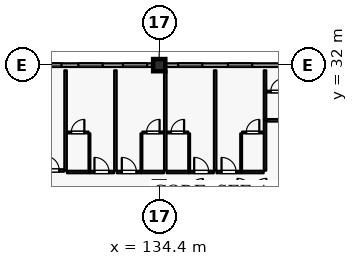
"""IFC4 building model, lengths in metres.
Left out: names, types, materials, properties, quantities, classifications, styles, units other than length and angle.
Written with IfcOpenShell. Run it as: python <this file> out.ifc"""

import sys

from ifc_helpers import new_model, si_unit, direction, frame, frame_2d, origin, origin_2d, place, context, subcontext, project, spatial, rectangle, extrude, element, fill, save


model = new_model("IFC4")
c1 = context("Model", 3, precision=1e-05, world=origin(), true_north=direction((0.0, 1.0)))
c2 = subcontext(c1, "Body", "Model", "MODEL_VIEW")
j1 = project(units=[si_unit("LENGTHUNIT", "METRE"), si_unit("PLANEANGLEUNIT", "RADIAN")], contexts=[c1])
p1 = place(None, origin())
s1 = spatial("IfcSite", under=j1, at=p1, CompositionType="ELEMENT")
p2 = place(p1, origin())
s2 = spatial("IfcBuilding", under=s1, at=p2, CompositionType="ELEMENT")
p3 = place(p2, frame((0.0, 0.0, 16.2)))
s3 = spatial("IfcBuildingStorey", under=s2, at=p3, CompositionType="ELEMENT", Elevation=16.2)
p4 = place(p3, frame((134.4, 32.0, 0.0), z_axis=(0.0, 0.0, 1.0), x_axis=(1.0, 0.0, 0.0)))
e1 = element("IfcColumn", 1, at=p4, inside=s3, PredefinedType="COLUMN", context=c2, shape_type="SweptSolid", body=[
    extrude(rectangle(XDim=0.8, YDim=0.8, at=origin_2d()), origin(), (0.0, 0.0, 1.0), 4.8),
])
p5 = place(p3, frame((134.4, 24.0, 0.0), z_axis=(0.0, 0.0, 1.0), x_axis=(1.0, 0.0, 0.0)))
e2 = element("IfcColumn", 2, at=p5, inside=s3, PredefinedType="COLUMN", context=c2, shape_type="SweptSolid", body=[
    extrude(rectangle(XDim=0.7, YDim=0.7, at=origin_2d()), origin(), (0.0, 0.0, 1.0), 4.8),
])
p6 = place(p3, frame((126.4, 32.0, 0.0), z_axis=(0.0, 0.0, 1.0), x_axis=(1.0, 0.0, 0.0)))
e3 = element("IfcWall", 3, at=p6, inside=s3, PredefinedType="SOLIDWALL", context=c2, shape_type="SweptSolid", body=[
    extrude(rectangle(XDim=7.6, YDim=0.24, at=frame_2d((3.8, 0.0))), origin(), (0.0, 0.0, 1.0), 4.09),
])
p7 = place(p6, frame((0.17, 0.0, 0.8)))
e4 = element("IfcOpeningElement", 4, at=p7, cuts=e3, PredefinedType="OPENING", context=c2, shape_type="SweptSolid", body=[
    extrude(rectangle(XDim=1.4, YDim=1.6, at=frame_2d((0.7, 0.8))), frame((0.0, 0.13, 0.0), z_axis=(0.0, -1.0, 0.0), x_axis=(1.0, 0.0, 0.0)), (0.0, 0.0, 1.0), 0.26),
])
p8 = place(p6, frame((2.68, 0.0, 0.8)))
e5 = element("IfcOpeningElement", 5, at=p8, cuts=e3, PredefinedType="OPENING", context=c2, shape_type="SweptSolid", body=[
    extrude(rectangle(XDim=1.6, YDim=1.6, at=frame_2d((0.8, 0.8))), frame((0.0, 0.13, 0.0), z_axis=(0.0, -1.0, 0.0), x_axis=(1.0, 0.0, 0.0)), (0.0, 0.0, 1.0), 0.26),
])
p9 = place(p6, frame((5.61, 0.0, 0.8)))
e6 = element("IfcOpeningElement", 6, at=p9, cuts=e3, PredefinedType="OPENING", context=c2, shape_type="SweptSolid", body=[
    extrude(rectangle(XDim=1.6, YDim=1.6, at=frame_2d((0.8, 0.8))), frame((0.0, 0.13, 0.0), z_axis=(0.0, -1.0, 0.0), x_axis=(1.0, 0.0, 0.0)), (0.0, 0.0, 1.0), 0.26),
])
p10 = place(p3, frame((134.8, 32.0, 0.0), z_axis=(0.0, 0.0, 1.0), x_axis=(1.0, 0.0, 0.0)))
e7 = element("IfcWall", 7, at=p10, inside=s3, PredefinedType="SOLIDWALL", context=c2, shape_type="SweptSolid", body=[
    extrude(rectangle(XDim=7.6, YDim=0.24, at=frame_2d((3.8, 0.0))), origin(), (0.0, 0.0, 1.0), 4.13),
])
p11 = place(p10, frame((0.84, 0.0, 0.8)))
e8 = element("IfcOpeningElement", 8, at=p11, cuts=e7, PredefinedType="OPENING", context=c2, shape_type="SweptSolid", body=[
    extrude(rectangle(XDim=1.6, YDim=1.6, at=frame_2d((0.8, 0.8))), frame((0.0, 0.13, 0.0), z_axis=(0.0, -1.0, 0.0), x_axis=(1.0, 0.0, 0.0)), (0.0, 0.0, 1.0), 0.26),
])
p12 = place(p10, frame((4.12, 0.0, 0.8)))
e9 = element("IfcOpeningElement", 9, at=p12, cuts=e7, PredefinedType="OPENING", context=c2, shape_type="SweptSolid", body=[
    extrude(rectangle(XDim=1.6, YDim=1.6, at=frame_2d((0.8, 0.8))), frame((0.0, 0.13, 0.0), z_axis=(0.0, -1.0, 0.0), x_axis=(1.0, 0.0, 0.0)), (0.0, 0.0, 1.0), 0.26),
])
p13 = place(p3, frame((126.53, 25.07, 0.0), z_axis=(0.0, 0.0, 1.0), x_axis=(1.0, 0.0, 0.0)))
e10 = element("IfcWall", 10, at=p13, inside=s3, PredefinedType="PARTITIONING", context=c2, shape_type="SweptSolid", body=[
    extrude(rectangle(XDim=1.62, YDim=0.16, at=frame_2d((0.81, 0.0))), origin(), (0.0, 0.0, 1.0), 4.535),
])
p14 = place(p13, frame((0.33, 0.0, 0.0)))
e11 = element("IfcOpeningElement", 11, at=p14, cuts=e10, PredefinedType="OPENING", context=c2, shape_type="SweptSolid", body=[
    extrude(rectangle(XDim=0.96, YDim=2.2, at=frame_2d((0.48, 1.1))), frame((0.0, 0.09, 0.0), z_axis=(0.0, -1.0, 0.0), x_axis=(1.0, 0.0, 0.0)), (0.0, 0.0, 1.0), 0.18),
])
p15 = place(p3, frame((128.33, 24.97, 0.0), z_axis=(0.0, 0.0, 1.0), x_axis=(1.0, 0.0, 0.0)))
e12 = element("IfcWall", 12, at=p15, inside=s3, PredefinedType="PARTITIONING", context=c2, shape_type="SweptSolid", body=[
    extrude(rectangle(XDim=1.47, YDim=0.16, at=frame_2d((0.735, 0.0))), origin(), (0.0, 0.0, 1.0), 4.535),
])
p16 = place(p3, frame((129.81, 24.97, 0.0), z_axis=(0.0, 0.0, 1.0), x_axis=(1.0, 0.0, 0.0)))
e13 = element("IfcWall", 13, at=p16, inside=s3, PredefinedType="PARTITIONING", context=c2, shape_type="SweptSolid", body=[
    extrude(rectangle(XDim=1.62, YDim=0.16, at=frame_2d((0.81, 0.0))), origin(), (0.0, 0.0, 1.0), 4.535),
])
p17 = place(p16, frame((0.33, 0.0, 0.0)))
e14 = element("IfcOpeningElement", 14, at=p17, cuts=e13, PredefinedType="OPENING", context=c2, shape_type="SweptSolid", body=[
    extrude(rectangle(XDim=0.96, YDim=2.2, at=frame_2d((0.48, 1.1))), frame((0.0, 0.09, 0.0), z_axis=(0.0, -1.0, 0.0), x_axis=(1.0, 0.0, 0.0)), (0.0, 0.0, 1.0), 0.18),
])
p18 = place(p3, frame((129.81, 25.06, 0.0), z_axis=(0.0, 0.0, 1.0), x_axis=(0.0, 1.0, 0.0)))
e15 = element("IfcWall", 15, at=p18, inside=s3, PredefinedType="PARTITIONING", context=c2, shape_type="SweptSolid", body=[
    extrude(rectangle(XDim=2.45, YDim=0.115, at=frame_2d((1.225, 0.0))), origin(), (0.0, 0.0, 1.0), 4.535),
])
p19 = place(p3, frame((128.34, 27.57, 0.0), z_axis=(0.0, 0.0, 1.0), x_axis=(1.0, 0.0, 0.0)))
e16 = element("IfcWall", 16, at=p19, inside=s3, PredefinedType="PARTITIONING", context=c2, shape_type="SweptSolid", body=[
    extrude(rectangle(XDim=1.41, YDim=0.115, at=frame_2d((0.705, 0.0))), origin(), (0.0, 0.0, 1.0), 4.535),
])
p20 = place(p19, frame((0.275, 0.0, 0.0)))
e17 = element("IfcOpeningElement", 17, at=p20, cuts=e16, PredefinedType="OPENING", context=c2, shape_type="SweptSolid", body=[
    extrude(rectangle(XDim=0.86, YDim=2.12, at=frame_2d((0.43, 1.06))), frame((0.0, 0.067, 0.0), z_axis=(0.0, -1.0, 0.0), x_axis=(1.0, 0.0, 0.0)), (0.0, 0.0, 1.0), 0.135),
])
p21 = place(p3, frame((128.24, 25.06, 0.0), z_axis=(0.0, 0.0, 1.0), x_axis=(0.0, 1.0, 0.0)))
e18 = element("IfcWall", 18, at=p21, inside=s3, PredefinedType="PARTITIONING", context=c2, shape_type="SweptSolid", body=[
    extrude(rectangle(XDim=6.6, YDim=0.16, at=frame_2d((3.3, 0.0))), origin(), (0.0, 0.0, 1.0), 4.535),
])
p22 = place(p3, frame((131.61, 24.97, 0.0), z_axis=(0.0, 0.0, 1.0), x_axis=(1.0, 0.0, 0.0)))
e19 = element("IfcWall", 19, at=p22, inside=s3, PredefinedType="PARTITIONING", context=c2, shape_type="SweptSolid", body=[
    extrude(rectangle(XDim=1.62, YDim=0.16, at=frame_2d((0.81, 0.0))), origin(), (0.0, 0.0, 1.0), 4.535),
])
p23 = place(p22, frame((0.33, 0.0, 0.0)))
e20 = element("IfcOpeningElement", 20, at=p23, cuts=e19, PredefinedType="OPENING", context=c2, shape_type="SweptSolid", body=[
    extrude(rectangle(XDim=0.96, YDim=2.2, at=frame_2d((0.48, 1.1))), frame((0.0, 0.09, 0.0), z_axis=(0.0, -1.0, 0.0), x_axis=(1.0, 0.0, 0.0)), (0.0, 0.0, 1.0), 0.18),
])
p24 = place(p3, frame((133.24, 24.97, 0.0), z_axis=(0.0, 0.0, 1.0), x_axis=(1.0, 0.0, 0.0)))
e21 = element("IfcWall", 21, at=p24, inside=s3, PredefinedType="PARTITIONING", context=c2, shape_type="SweptSolid", body=[
    extrude(rectangle(XDim=1.47, YDim=0.16, at=frame_2d((0.735, 0.0))), origin(), (0.0, 0.0, 1.0), 4.535),
])
p25 = place(p3, frame((133.23, 25.06, 0.0), z_axis=(0.0, 0.0, 1.0), x_axis=(0.0, 1.0, 0.0)))
e22 = element("IfcWall", 22, at=p25, inside=s3, PredefinedType="PARTITIONING", context=c2, shape_type="SweptSolid", body=[
    extrude(rectangle(XDim=2.45, YDim=0.115, at=frame_2d((1.225, 0.0))), origin(), (0.0, 0.0, 1.0), 4.535),
])
p26 = place(p3, frame((133.29, 27.57, 0.0), z_axis=(0.0, 0.0, 1.0), x_axis=(1.0, 0.0, 0.0)))
e23 = element("IfcWall", 23, at=p26, inside=s3, PredefinedType="PARTITIONING", context=c2, shape_type="SweptSolid", body=[
    extrude(rectangle(XDim=1.41, YDim=0.115, at=frame_2d((0.705, 0.0))), origin(), (0.0, 0.0, 1.0), 4.535),
])
p27 = place(p26, frame((0.275, 0.0, 0.0)))
e24 = element("IfcOpeningElement", 24, at=p27, cuts=e23, PredefinedType="OPENING", context=c2, shape_type="SweptSolid", body=[
    extrude(rectangle(XDim=0.86, YDim=2.12, at=frame_2d((0.43, 1.06))), frame((0.0, 0.067, 0.0), z_axis=(0.0, -1.0, 0.0), x_axis=(1.0, 0.0, 0.0)), (0.0, 0.0, 1.0), 0.135),
])
p28 = place(p3, frame((131.52, 25.06, 0.0), z_axis=(0.0, 0.0, 1.0), x_axis=(0.0, 1.0, 0.0)))
e25 = element("IfcWall", 25, at=p28, inside=s3, PredefinedType="PARTITIONING", context=c2, shape_type="SweptSolid", body=[
    extrude(rectangle(XDim=6.6, YDim=0.16, at=frame_2d((3.3, 0.0))), origin(), (0.0, 0.0, 1.0), 4.535),
])
p29 = place(p3, frame((134.89, 24.97, 0.0), z_axis=(0.0, 0.0, 1.0), x_axis=(1.0, 0.0, 0.0)))
e26 = element("IfcWall", 26, at=p29, inside=s3, PredefinedType="PARTITIONING", context=c2, shape_type="SweptSolid", body=[
    extrude(rectangle(XDim=1.47, YDim=0.16, at=frame_2d((0.735, 0.0))), origin(), (0.0, 0.0, 1.0), 4.535),
])
p30 = place(p3, frame((136.37, 24.97, 0.0), z_axis=(0.0, 0.0, 1.0), x_axis=(1.0, 0.0, 0.0)))
e27 = element("IfcWall", 27, at=p30, inside=s3, PredefinedType="PARTITIONING", context=c2, shape_type="SweptSolid", body=[
    extrude(rectangle(XDim=1.62, YDim=0.16, at=frame_2d((0.81, 0.0))), origin(), (0.0, 0.0, 1.0), 4.535),
])
p31 = place(p30, frame((0.33, 0.0, 0.0)))
e28 = element("IfcOpeningElement", 28, at=p31, cuts=e27, PredefinedType="OPENING", context=c2, shape_type="SweptSolid", body=[
    extrude(rectangle(XDim=0.96, YDim=2.2, at=frame_2d((0.48, 1.1))), frame((0.0, 0.09, 0.0), z_axis=(0.0, -1.0, 0.0), x_axis=(1.0, 0.0, 0.0)), (0.0, 0.0, 1.0), 0.18),
])
p32 = place(p3, frame((136.37, 25.06, 0.0), z_axis=(0.0, 0.0, 1.0), x_axis=(0.0, 1.0, 0.0)))
e29 = element("IfcWall", 29, at=p32, inside=s3, PredefinedType="PARTITIONING", context=c2, shape_type="SweptSolid", body=[
    extrude(rectangle(XDim=2.45, YDim=0.115, at=frame_2d((1.225, 0.0))), origin(), (0.0, 0.0, 1.0), 4.535),
])
p33 = place(p3, frame((134.9, 27.57, 0.0), z_axis=(0.0, 0.0, 1.0), x_axis=(1.0, 0.0, 0.0)))
e30 = element("IfcWall", 30, at=p33, inside=s3, PredefinedType="PARTITIONING", context=c2, shape_type="SweptSolid", body=[
    extrude(rectangle(XDim=1.41, YDim=0.115, at=frame_2d((0.705, 0.0))), origin(), (0.0, 0.0, 1.0), 4.535),
])
p34 = place(p33, frame((0.275, 0.0, 0.0)))
e31 = element("IfcOpeningElement", 31, at=p34, cuts=e30, PredefinedType="OPENING", context=c2, shape_type="SweptSolid", body=[
    extrude(rectangle(XDim=0.86, YDim=2.12, at=frame_2d((0.43, 1.06))), frame((0.0, 0.067, 0.0), z_axis=(0.0, -1.0, 0.0), x_axis=(1.0, 0.0, 0.0)), (0.0, 0.0, 1.0), 0.135),
])
p35 = place(p3, frame((134.8, 25.06, 0.0), z_axis=(0.0, 0.0, 1.0), x_axis=(0.0, 1.0, 0.0)))
e32 = element("IfcWall", 32, at=p35, inside=s3, PredefinedType="PARTITIONING", context=c2, shape_type="SweptSolid", body=[
    extrude(rectangle(XDim=6.6, YDim=0.16, at=frame_2d((3.3, 0.0))), origin(), (0.0, 0.0, 1.0), 4.535),
])
p36 = place(p3, frame((138.17, 24.97, 0.0), z_axis=(0.0, 0.0, 1.0), x_axis=(1.0, 0.0, 0.0)))
e33 = element("IfcWall", 33, at=p36, inside=s3, PredefinedType="PARTITIONING", context=c2, shape_type="SweptSolid", body=[
    extrude(rectangle(XDim=1.62, YDim=0.16, at=frame_2d((0.81, 0.0))), origin(), (0.0, 0.0, 1.0), 4.535),
])
p37 = place(p36, frame((0.33, 0.0, 0.0)))
e34 = element("IfcOpeningElement", 34, at=p37, cuts=e33, PredefinedType="OPENING", context=c2, shape_type="SweptSolid", body=[
    extrude(rectangle(XDim=0.96, YDim=2.2, at=frame_2d((0.48, 1.1))), frame((0.0, 0.09, 0.0), z_axis=(0.0, -1.0, 0.0), x_axis=(1.0, 0.0, 0.0)), (0.0, 0.0, 1.0), 0.18),
])
p38 = place(p3, frame((139.8, 24.97, 0.0), z_axis=(0.0, 0.0, 1.0), x_axis=(1.0, 0.0, 0.0)))
e35 = element("IfcWall", 35, at=p38, inside=s3, PredefinedType="PARTITIONING", context=c2, shape_type="SweptSolid", body=[
    extrude(rectangle(XDim=1.47, YDim=0.16, at=frame_2d((0.735, 0.0))), origin(), (0.0, 0.0, 1.0), 4.535),
])
p39 = place(p3, frame((139.79, 25.06, 0.0), z_axis=(0.0, 0.0, 1.0), x_axis=(0.0, 1.0, 0.0)))
e36 = element("IfcWall", 36, at=p39, inside=s3, PredefinedType="PARTITIONING", context=c2, shape_type="SweptSolid", body=[
    extrude(rectangle(XDim=2.45, YDim=0.115, at=frame_2d((1.225, 0.0))), origin(), (0.0, 0.0, 1.0), 4.535),
])
p40 = place(p3, frame((139.85, 27.57, 0.0), z_axis=(0.0, 0.0, 1.0), x_axis=(1.0, 0.0, 0.0)))
e37 = element("IfcWall", 37, at=p40, inside=s3, PredefinedType="PARTITIONING", context=c2, shape_type="SweptSolid", body=[
    extrude(rectangle(XDim=1.41, YDim=0.115, at=frame_2d((0.705, 0.0))), origin(), (0.0, 0.0, 1.0), 4.535),
])
p41 = place(p40, frame((0.275, 0.0, 0.0)))
e38 = element("IfcOpeningElement", 38, at=p41, cuts=e37, PredefinedType="OPENING", context=c2, shape_type="SweptSolid", body=[
    extrude(rectangle(XDim=0.86, YDim=2.12, at=frame_2d((0.43, 1.06))), frame((0.0, 0.067, 0.0), z_axis=(0.0, -1.0, 0.0), x_axis=(1.0, 0.0, 0.0)), (0.0, 0.0, 1.0), 0.135),
])
p42 = place(p3, frame((138.08, 25.06, 0.0), z_axis=(0.0, 0.0, 1.0), x_axis=(0.0, 1.0, 0.0)))
e39 = element("IfcWall", 39, at=p42, inside=s3, PredefinedType="PARTITIONING", context=c2, shape_type="SweptSolid", body=[
    extrude(rectangle(XDim=6.6, YDim=0.16, at=frame_2d((3.3, 0.0))), origin(), (0.0, 0.0, 1.0), 4.535),
])
p43 = place(p3, frame((141.36, 25.06, 0.0), z_axis=(0.0, 0.0, 1.0), x_axis=(0.0, 1.0, 0.0)))
e40 = element("IfcWall", 40, at=p43, inside=s3, PredefinedType="PARTITIONING", context=c2, shape_type="SweptSolid", body=[
    extrude(rectangle(XDim=3.39, YDim=0.16, at=frame_2d((1.695, 0.0))), origin(), (0.0, 0.0, 1.0), 4.535),
])
p44 = place(p3, frame((141.45, 28.37, 0.0), z_axis=(0.0, 0.0, 1.0), x_axis=(1.0, 0.0, 0.0)))
e41 = element("IfcWall", 41, at=p44, inside=s3, PredefinedType="PARTITIONING", context=c2, shape_type="SweptSolid", body=[
    extrude(rectangle(XDim=1.47, YDim=0.16, at=frame_2d((0.735, 0.0))), origin(), (0.0, 0.0, 1.0), 4.535),
])
p45 = place(p3, frame((141.46, 30.26, 0.0), z_axis=(0.0, 0.0, 1.0), x_axis=(1.0, 0.0, 0.0)))
e42 = element("IfcWall", 42, at=p45, inside=s3, PredefinedType="PARTITIONING", context=c2, shape_type="SweptSolid", body=[
    extrude(rectangle(XDim=1.41, YDim=0.115, at=frame_2d((0.705, 0.0))), origin(), (0.0, 0.0, 1.0), 4.535),
])
p46 = place(p45, frame((0.275, 0.0, 0.0)))
e43 = element("IfcOpeningElement", 43, at=p46, cuts=e42, PredefinedType="OPENING", context=c2, shape_type="SweptSolid", body=[
    extrude(rectangle(XDim=0.86, YDim=2.12, at=frame_2d((0.43, 1.06))), frame((0.0, 0.067, 0.0), z_axis=(0.0, -1.0, 0.0), x_axis=(1.0, 0.0, 0.0)), (0.0, 0.0, 1.0), 0.135),
])
p47 = place(p3, frame((141.36, 28.46, 0.0), z_axis=(0.0, 0.0, 1.0), x_axis=(0.0, 1.0, 0.0)))
e44 = element("IfcWall", 44, at=p47, inside=s3, PredefinedType="PARTITIONING", context=c2, shape_type="SweptSolid", body=[
    extrude(rectangle(XDim=3.2, YDim=0.16, at=frame_2d((1.6, 0.0))), origin(), (0.0, 0.0, 1.0), 4.535),
])
p48 = place(p7, origin())
e45 = element("IfcWindow", 45, at=p48, inside=s3, PartitioningType="SINGLE_PANEL", PredefinedType="WINDOW", context=c2, shape_type="SweptSolid", body=[
    extrude(rectangle(XDim=1.4, YDim=1.6, at=frame_2d((0.7, 0.8))), frame((0.0, 0.03, 0.0), z_axis=(0.0, -1.0, 0.0), x_axis=(1.0, 0.0, 0.0)), (0.0, 0.0, 1.0), 0.06),
])
fill(e4, e45)
p49 = place(p8, origin())
e46 = element("IfcWindow", 46, at=p49, inside=s3, PartitioningType="SINGLE_PANEL", PredefinedType="WINDOW", context=c2, shape_type="SweptSolid", body=[
    extrude(rectangle(XDim=1.6, YDim=1.6, at=frame_2d((0.8, 0.8))), frame((0.0, 0.03, 0.0), z_axis=(0.0, -1.0, 0.0), x_axis=(1.0, 0.0, 0.0)), (0.0, 0.0, 1.0), 0.06),
])
fill(e5, e46)
p50 = place(p9, origin())
e47 = element("IfcWindow", 47, at=p50, inside=s3, PartitioningType="SINGLE_PANEL", PredefinedType="WINDOW", context=c2, shape_type="SweptSolid", body=[
    extrude(rectangle(XDim=1.6, YDim=1.6, at=frame_2d((0.8, 0.8))), frame((0.0, 0.03, 0.0), z_axis=(0.0, -1.0, 0.0), x_axis=(1.0, 0.0, 0.0)), (0.0, 0.0, 1.0), 0.06),
])
fill(e6, e47)
p51 = place(p11, origin())
e48 = element("IfcWindow", 48, at=p51, inside=s3, PartitioningType="SINGLE_PANEL", PredefinedType="WINDOW", context=c2, shape_type="SweptSolid", body=[
    extrude(rectangle(XDim=1.6, YDim=1.6, at=frame_2d((0.8, 0.8))), frame((0.0, 0.03, 0.0), z_axis=(0.0, -1.0, 0.0), x_axis=(1.0, 0.0, 0.0)), (0.0, 0.0, 1.0), 0.06),
])
fill(e8, e48)
p52 = place(p12, origin())
e49 = element("IfcWindow", 49, at=p52, inside=s3, PartitioningType="SINGLE_PANEL", PredefinedType="WINDOW", context=c2, shape_type="SweptSolid", body=[
    extrude(rectangle(XDim=1.6, YDim=1.6, at=frame_2d((0.8, 0.8))), frame((0.0, 0.03, 0.0), z_axis=(0.0, -1.0, 0.0), x_axis=(1.0, 0.0, 0.0)), (0.0, 0.0, 1.0), 0.06),
])
fill(e9, e49)
p53 = place(p14, origin())
e50 = element("IfcDoor", 50, at=p53, inside=s3, OperationType="SINGLE_SWING_LEFT", PredefinedType="DOOR", context=c2, shape_type="SweptSolid", body=[
    extrude(rectangle(XDim=0.96, YDim=2.2, at=frame_2d((0.48, 1.1))), frame((0.0, 0.025, 0.0), z_axis=(0.0, -1.0, 0.0), x_axis=(1.0, 0.0, 0.0)), (0.0, 0.0, 1.0), 0.05),
])
fill(e11, e50)
p54 = place(p17, origin())
e51 = element("IfcDoor", 51, at=p54, inside=s3, OperationType="SINGLE_SWING_LEFT", PredefinedType="DOOR", context=c2, shape_type="SweptSolid", body=[
    extrude(rectangle(XDim=0.96, YDim=2.2, at=frame_2d((0.48, 1.1))), frame((0.0, 0.025, 0.0), z_axis=(0.0, -1.0, 0.0), x_axis=(1.0, 0.0, 0.0)), (0.0, 0.0, 1.0), 0.05),
])
fill(e14, e51)
p55 = place(p20, origin())
e52 = element("IfcDoor", 52, at=p55, inside=s3, OperationType="SINGLE_SWING_RIGHT", PredefinedType="DOOR", context=c2, shape_type="SweptSolid", body=[
    extrude(rectangle(XDim=0.86, YDim=2.12, at=frame_2d((0.43, 1.06))), frame((0.0, 0.025, 0.0), z_axis=(0.0, -1.0, 0.0), x_axis=(1.0, 0.0, 0.0)), (0.0, 0.0, 1.0), 0.05),
])
fill(e17, e52)
p56 = place(p23, origin())
e53 = element("IfcDoor", 53, at=p56, inside=s3, OperationType="SINGLE_SWING_LEFT", PredefinedType="DOOR", context=c2, shape_type="SweptSolid", body=[
    extrude(rectangle(XDim=0.96, YDim=2.2, at=frame_2d((0.48, 1.1))), frame((0.0, 0.025, 0.0), z_axis=(0.0, -1.0, 0.0), x_axis=(1.0, 0.0, 0.0)), (0.0, 0.0, 1.0), 0.05),
])
fill(e20, e53)
p57 = place(p27, origin())
e54 = element("IfcDoor", 54, at=p57, inside=s3, OperationType="SINGLE_SWING_RIGHT", PredefinedType="DOOR", context=c2, shape_type="SweptSolid", body=[
    extrude(rectangle(XDim=0.86, YDim=2.12, at=frame_2d((0.43, 1.06))), frame((0.0, 0.025, 0.0), z_axis=(0.0, -1.0, 0.0), x_axis=(1.0, 0.0, 0.0)), (0.0, 0.0, 1.0), 0.05),
])
fill(e24, e54)
p58 = place(p31, origin())
e55 = element("IfcDoor", 55, at=p58, inside=s3, OperationType="SINGLE_SWING_LEFT", PredefinedType="DOOR", context=c2, shape_type="SweptSolid", body=[
    extrude(rectangle(XDim=0.96, YDim=2.2, at=frame_2d((0.48, 1.1))), frame((0.0, 0.025, 0.0), z_axis=(0.0, -1.0, 0.0), x_axis=(1.0, 0.0, 0.0)), (0.0, 0.0, 1.0), 0.05),
])
fill(e28, e55)
p59 = place(p34, origin())
e56 = element("IfcDoor", 56, at=p59, inside=s3, OperationType="SINGLE_SWING_RIGHT", PredefinedType="DOOR", context=c2, shape_type="SweptSolid", body=[
    extrude(rectangle(XDim=0.86, YDim=2.12, at=frame_2d((0.43, 1.06))), frame((0.0, 0.025, 0.0), z_axis=(0.0, -1.0, 0.0), x_axis=(1.0, 0.0, 0.0)), (0.0, 0.0, 1.0), 0.05),
])
fill(e31, e56)
p60 = place(p37, origin())
e57 = element("IfcDoor", 57, at=p60, inside=s3, OperationType="SINGLE_SWING_LEFT", PredefinedType="DOOR", context=c2, shape_type="SweptSolid", body=[
    extrude(rectangle(XDim=0.96, YDim=2.2, at=frame_2d((0.48, 1.1))), frame((0.0, 0.025, 0.0), z_axis=(0.0, -1.0, 0.0), x_axis=(1.0, 0.0, 0.0)), (0.0, 0.0, 1.0), 0.05),
])
fill(e34, e57)
p61 = place(p41, origin())
e58 = element("IfcDoor", 58, at=p61, inside=s3, OperationType="SINGLE_SWING_RIGHT", PredefinedType="DOOR", context=c2, shape_type="SweptSolid", body=[
    extrude(rectangle(XDim=0.86, YDim=2.12, at=frame_2d((0.43, 1.06))), frame((0.0, 0.025, 0.0), z_axis=(0.0, -1.0, 0.0), x_axis=(1.0, 0.0, 0.0)), (0.0, 0.0, 1.0), 0.05),
])
fill(e38, e58)
p62 = place(p46, origin())
e59 = element("IfcDoor", 59, at=p62, inside=s3, OperationType="SINGLE_SWING_RIGHT", PredefinedType="DOOR", context=c2, shape_type="SweptSolid", body=[
    extrude(rectangle(XDim=0.86, YDim=2.12, at=frame_2d((0.43, 1.06))), frame((0.0, 0.025, 0.0), z_axis=(0.0, -1.0, 0.0), x_axis=(1.0, 0.0, 0.0)), (0.0, 0.0, 1.0), 0.05),
])
fill(e43, e59)
save(model, sys.argv[1])
